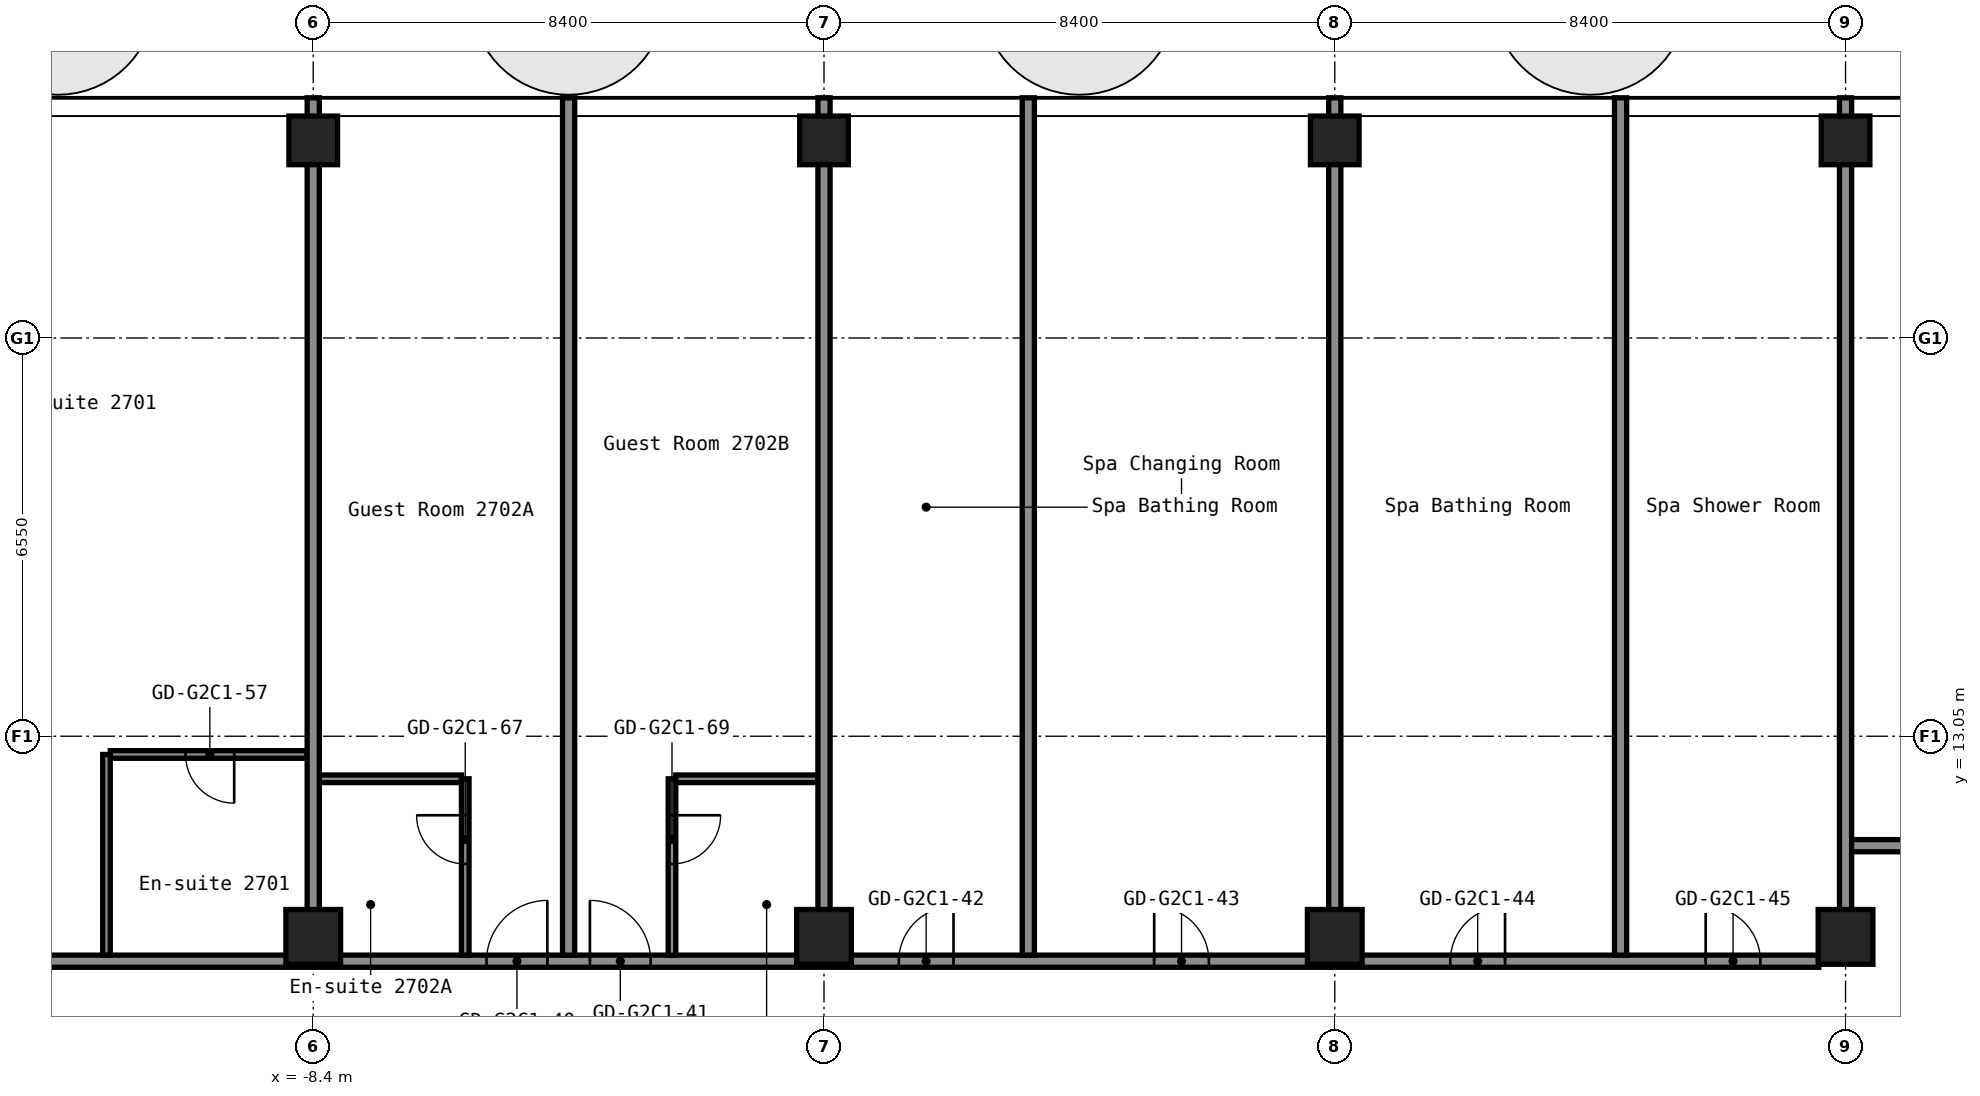
"""IFC4 building model, lengths in metres.
Left out: names, types, materials, properties, quantities, classifications, styles, units other than length and angle.
Written with IfcOpenShell. Run it as: python <this file> out.ifc"""

import sys

from ifc_helpers import new_model, si_unit, direction, frame, frame_2d, origin, origin_2d, place, context, subcontext, project, spatial, rectangle, hollow_rectangle, extrude, element, fill, save


model = new_model("IFC4")
c1 = context("Model", 3, precision=1e-05, world=origin(), true_north=direction((0.0, 1.0)))
c2 = subcontext(c1, "Body", "Model", "MODEL_VIEW")
j1 = project(units=[si_unit("LENGTHUNIT", "METRE"), si_unit("PLANEANGLEUNIT", "RADIAN")], contexts=[c1])
p1 = place(None, origin())
s1 = spatial("IfcSite", under=j1, at=p1, CompositionType="ELEMENT")
p2 = place(p1, origin())
s2 = spatial("IfcBuilding", under=s1, at=p2, CompositionType="ELEMENT")
p3 = place(p2, frame((0.0, 0.0, 97.8)))
s3 = spatial("IfcBuildingStorey", under=s2, at=p3, CompositionType="ELEMENT", Elevation=97.8)
p4 = place(p3, frame((-8.4, 9.75, 0.0), z_axis=(0.0, 0.0, 1.0), x_axis=(1.0, 0.0, 0.0)))
e1 = element("IfcColumn", 1, at=p4, inside=s3, PredefinedType="COLUMN", context=c2, shape_type="SweptSolid", body=[
    extrude(hollow_rectangle(XDim=0.9, YDim=0.9, WallThickness=0.036, at=origin_2d()), origin(), (0.0, 0.0, 1.0), 2.8),
])
p5 = place(p3, frame((-8.4, 22.85, 0.0), z_axis=(0.0, 0.0, 1.0), x_axis=(1.0, 0.0, 0.0)))
e2 = element("IfcColumn", 2, at=p5, inside=s3, PredefinedType="COLUMN", context=c2, shape_type="SweptSolid", body=[
    extrude(hollow_rectangle(XDim=0.8, YDim=0.8, WallThickness=0.032, at=origin_2d()), origin(), (0.0, 0.0, 1.0), 2.8),
])
p6 = place(p3, frame((0.0, 9.75, 0.0), z_axis=(0.0, 0.0, 1.0), x_axis=(1.0, 0.0, 0.0)))
e3 = element("IfcColumn", 3, at=p6, inside=s3, PredefinedType="COLUMN", context=c2, shape_type="SweptSolid", body=[
    extrude(hollow_rectangle(XDim=0.9, YDim=0.9, WallThickness=0.036, at=origin_2d()), origin(), (0.0, 0.0, 1.0), 2.8),
])
p7 = place(p3, frame((0.0, 22.85, 0.0), z_axis=(0.0, 0.0, 1.0), x_axis=(1.0, 0.0, 0.0)))
e4 = element("IfcColumn", 4, at=p7, inside=s3, PredefinedType="COLUMN", context=c2, shape_type="SweptSolid", body=[
    extrude(hollow_rectangle(XDim=0.8, YDim=0.8, WallThickness=0.032, at=origin_2d()), origin(), (0.0, 0.0, 1.0), 2.8),
])
p8 = place(p3, frame((8.4, 9.75, 0.0), z_axis=(0.0, 0.0, 1.0), x_axis=(1.0, 0.0, 0.0)))
e5 = element("IfcColumn", 5, at=p8, inside=s3, PredefinedType="COLUMN", context=c2, shape_type="SweptSolid", body=[
    extrude(hollow_rectangle(XDim=0.9, YDim=0.9, WallThickness=0.036, at=origin_2d()), origin(), (0.0, 0.0, 1.0), 2.8),
])
p9 = place(p3, frame((8.4, 22.85, 0.0), z_axis=(0.0, 0.0, 1.0), x_axis=(1.0, 0.0, 0.0)))
e6 = element("IfcColumn", 6, at=p9, inside=s3, PredefinedType="COLUMN", context=c2, shape_type="SweptSolid", body=[
    extrude(hollow_rectangle(XDim=0.8, YDim=0.8, WallThickness=0.032, at=origin_2d()), origin(), (0.0, 0.0, 1.0), 2.8),
])
p10 = place(p3, frame((16.8, 9.75, 0.0), z_axis=(0.0, 0.0, 1.0), x_axis=(1.0, 0.0, 0.0)))
e7 = element("IfcColumn", 7, at=p10, inside=s3, PredefinedType="COLUMN", context=c2, shape_type="SweptSolid", body=[
    extrude(hollow_rectangle(XDim=0.9, YDim=0.9, WallThickness=0.036, at=origin_2d()), origin(), (0.0, 0.0, 1.0), 2.8),
])
p11 = place(p3, frame((16.8, 22.85, 0.0), z_axis=(0.0, 0.0, 1.0), x_axis=(1.0, 0.0, 0.0)))
e8 = element("IfcColumn", 8, at=p11, inside=s3, PredefinedType="COLUMN", context=c2, shape_type="SweptSolid", body=[
    extrude(hollow_rectangle(XDim=0.8, YDim=0.8, WallThickness=0.032, at=origin_2d()), origin(), (0.0, 0.0, 1.0), 2.8),
])
p12 = place(p3, frame((-16.36, 9.35, 0.0), z_axis=(0.0, 0.0, 1.0), x_axis=(1.0, 0.0, 0.0)))
e9 = element("IfcWall", 9, at=p12, inside=s3, PredefinedType="PARTITIONING", context=c2, shape_type="SweptSolid", body=[
    extrude(rectangle(XDim=32.72, YDim=0.2, at=frame_2d((16.36, 0.0))), origin(), (0.0, 0.0, 1.0), 2.8),
])
p13 = place(p12, frame((1.56, 0.0, 0.0)))
e10 = element("IfcOpeningElement", 10, at=p13, cuts=e9, PredefinedType="OPENING", context=c2, shape_type="SweptSolid", body=[
    extrude(rectangle(XDim=1.0, YDim=2.1, at=frame_2d((0.5, 1.05))), frame((0.0, 0.11, 0.0), z_axis=(0.0, -1.0, 0.0), x_axis=(1.0, 0.0, 0.0)), (0.0, 0.0, 1.0), 0.22),
])
p14 = place(p12, frame((10.81, 0.0, 0.0)))
e11 = element("IfcOpeningElement", 11, at=p14, cuts=e9, PredefinedType="OPENING", context=c2, shape_type="SweptSolid", body=[
    extrude(rectangle(XDim=1.0, YDim=2.1, at=frame_2d((0.5, 1.05))), frame((0.0, 0.11, 0.0), z_axis=(0.0, -1.0, 0.0), x_axis=(1.0, 0.0, 0.0)), (0.0, 0.0, 1.0), 0.22),
])
p15 = place(p12, frame((12.51, 0.0, 0.0)))
e12 = element("IfcOpeningElement", 12, at=p15, cuts=e9, PredefinedType="OPENING", context=c2, shape_type="SweptSolid", body=[
    extrude(rectangle(XDim=1.0, YDim=2.1, at=frame_2d((0.5, 1.05))), frame((0.0, 0.11, 0.0), z_axis=(0.0, -1.0, 0.0), x_axis=(1.0, 0.0, 0.0)), (0.0, 0.0, 1.0), 0.22),
])
p16 = place(p12, frame((17.59, 0.0, 0.0)))
e13 = element("IfcOpeningElement", 13, at=p16, cuts=e9, PredefinedType="OPENING", context=c2, shape_type="SweptSolid", body=[
    extrude(rectangle(XDim=0.9, YDim=2.1, at=frame_2d((0.45, 1.05))), frame((0.0, 0.11, 0.0), z_axis=(0.0, -1.0, 0.0), x_axis=(1.0, 0.0, 0.0)), (0.0, 0.0, 1.0), 0.22),
])
p17 = place(p12, frame((21.79, 0.0, 0.0)))
e14 = element("IfcOpeningElement", 14, at=p17, cuts=e9, PredefinedType="OPENING", context=c2, shape_type="SweptSolid", body=[
    extrude(rectangle(XDim=0.9, YDim=2.1, at=frame_2d((0.45, 1.05))), frame((0.0, 0.11, 0.0), z_axis=(0.0, -1.0, 0.0), x_axis=(1.0, 0.0, 0.0)), (0.0, 0.0, 1.0), 0.22),
])
p18 = place(p12, frame((26.66, 0.0, 0.0)))
e15 = element("IfcOpeningElement", 15, at=p18, cuts=e9, PredefinedType="OPENING", context=c2, shape_type="SweptSolid", body=[
    extrude(rectangle(XDim=0.9, YDim=2.1, at=frame_2d((0.45, 1.05))), frame((0.0, 0.11, 0.0), z_axis=(0.0, -1.0, 0.0), x_axis=(1.0, 0.0, 0.0)), (0.0, 0.0, 1.0), 0.22),
])
p19 = place(p12, frame((30.86, 0.0, 0.0)))
e16 = element("IfcOpeningElement", 16, at=p19, cuts=e9, PredefinedType="OPENING", context=c2, shape_type="SweptSolid", body=[
    extrude(rectangle(XDim=0.9, YDim=2.1, at=frame_2d((0.45, 1.05))), frame((0.0, 0.11, 0.0), z_axis=(0.0, -1.0, 0.0), x_axis=(1.0, 0.0, 0.0)), (0.0, 0.0, 1.0), 0.22),
])
p20 = place(p3, frame((16.8, 11.25, 0.0), z_axis=(0.0, 0.0, 1.0), x_axis=(1.0, 0.0, 0.0)))
e17 = element("IfcWall", 17, at=p20, inside=s3, PredefinedType="PARTITIONING", context=c2, shape_type="SweptSolid", body=[
    extrude(rectangle(XDim=29.7, YDim=0.2, at=frame_2d((14.85, 0.0))), origin(), (0.0, 0.0, 1.0), 2.8),
])
p21 = place(p20, frame((2.0, 0.0, 0.0)))
e18 = element("IfcOpeningElement", 18, at=p21, cuts=e17, PredefinedType="OPENING", context=c2, shape_type="SweptSolid", body=[
    extrude(rectangle(XDim=1.0, YDim=2.1, at=frame_2d((0.5, 1.05))), frame((0.0, 0.11, 0.0), z_axis=(0.0, -1.0, 0.0), x_axis=(1.0, 0.0, 0.0)), (0.0, 0.0, 1.0), 0.22),
])
p22 = place(p20, frame((11.25, 0.0, 0.0)))
e19 = element("IfcOpeningElement", 19, at=p22, cuts=e17, PredefinedType="OPENING", context=c2, shape_type="SweptSolid", body=[
    extrude(rectangle(XDim=1.0, YDim=2.1, at=frame_2d((0.5, 1.05))), frame((0.0, 0.11, 0.0), z_axis=(0.0, -1.0, 0.0), x_axis=(1.0, 0.0, 0.0)), (0.0, 0.0, 1.0), 0.22),
])
p23 = place(p20, frame((12.95, 0.0, 0.0)))
e20 = element("IfcOpeningElement", 20, at=p23, cuts=e17, PredefinedType="OPENING", context=c2, shape_type="SweptSolid", body=[
    extrude(rectangle(XDim=1.0, YDim=2.1, at=frame_2d((0.5, 1.05))), frame((0.0, 0.11, 0.0), z_axis=(0.0, -1.0, 0.0), x_axis=(1.0, 0.0, 0.0)), (0.0, 0.0, 1.0), 0.22),
])
p24 = place(p20, frame((22.2, 0.0, 0.0)))
e21 = element("IfcOpeningElement", 21, at=p24, cuts=e17, PredefinedType="OPENING", context=c2, shape_type="SweptSolid", body=[
    extrude(rectangle(XDim=1.0, YDim=2.1, at=frame_2d((0.5, 1.05))), frame((0.0, 0.11, 0.0), z_axis=(0.0, -1.0, 0.0), x_axis=(1.0, 0.0, 0.0)), (0.0, 0.0, 1.0), 0.22),
])
p25 = place(p20, frame((26.85, 0.0, 0.0)))
e22 = element("IfcOpeningElement", 22, at=p25, cuts=e17, PredefinedType="OPENING", context=c2, shape_type="SweptSolid", body=[
    extrude(rectangle(XDim=0.9, YDim=2.1, at=frame_2d((0.45, 1.05))), frame((0.0, 0.11, 0.0), z_axis=(0.0, -1.0, 0.0), x_axis=(1.0, 0.0, 0.0)), (0.0, 0.0, 1.0), 0.22),
])
p26 = place(p3, frame((-8.3, 12.35, 0.0), z_axis=(0.0, 0.0, 1.0), x_axis=(1.0, 0.0, 0.0)))
e23 = element("IfcWall", 23, at=p26, inside=s3, PredefinedType="PARTITIONING", context=c2, shape_type="SweptSolid", body=[
    extrude(rectangle(XDim=2.338, YDim=0.125, at=frame_2d((1.169, 0.0))), origin(), (0.0, 0.0, 1.0), 2.8),
])
p27 = place(p3, frame((-2.438, 12.35, 0.0), z_axis=(0.0, 0.0, 1.0), x_axis=(1.0, 0.0, 0.0)))
e24 = element("IfcWall", 24, at=p27, inside=s3, PredefinedType="PARTITIONING", context=c2, shape_type="SweptSolid", body=[
    extrude(rectangle(XDim=2.337, YDim=0.125, at=frame_2d((1.169, 0.0))), origin(), (0.0, 0.0, 1.0), 2.8),
])
p28 = place(p3, frame((-11.738, 12.75, 0.0), z_axis=(0.0, 0.0, 1.0), x_axis=(1.0, 0.0, 0.0)))
e25 = element("IfcWall", 25, at=p28, inside=s3, PredefinedType="PARTITIONING", context=c2, shape_type="SweptSolid", body=[
    extrude(rectangle(XDim=3.238, YDim=0.125, at=frame_2d((1.619, 0.0))), origin(), (0.0, 0.0, 1.0), 2.8),
])
p29 = place(p28, frame((1.238, 0.0, 0.0)))
e26 = element("IfcOpeningElement", 26, at=p29, cuts=e25, PredefinedType="OPENING", context=c2, shape_type="SweptSolid", body=[
    extrude(rectangle(XDim=0.8, YDim=2.1, at=frame_2d((0.4, 1.05))), frame((0.0, 0.073, 0.0), z_axis=(0.0, -1.0, 0.0), x_axis=(1.0, 0.0, 0.0)), (0.0, 0.0, 1.0), 0.145),
])
p30 = place(p3, frame((-11.8, 9.45, 0.0), z_axis=(0.0, 0.0, 1.0), x_axis=(0.0, 1.0, 0.0)))
e27 = element("IfcWall", 27, at=p30, inside=s3, PredefinedType="PARTITIONING", context=c2, shape_type="SweptSolid", body=[
    extrude(rectangle(XDim=3.3, YDim=0.125, at=frame_2d((1.65, 0.0))), origin(), (0.0, 0.0, 1.0), 2.8),
])
p31 = place(p3, frame((-8.4, 10.19, 0.0), z_axis=(0.0, 0.0, 1.0), x_axis=(0.0, 1.0, 0.0)))
e28 = element("IfcWall", 28, at=p31, inside=s3, PredefinedType="PARTITIONING", context=c2, shape_type="SweptSolid", body=[
    extrude(rectangle(XDim=13.36, YDim=0.2, at=frame_2d((6.68, 0.0))), origin(), (0.0, 0.0, 1.0), 2.8),
])
p32 = place(p3, frame((-5.9, 9.45, 0.0), z_axis=(0.0, 0.0, 1.0), x_axis=(0.0, 1.0, 0.0)))
e29 = element("IfcWall", 29, at=p32, inside=s3, PredefinedType="PARTITIONING", context=c2, shape_type="SweptSolid", body=[
    extrude(rectangle(XDim=2.9, YDim=0.125, at=frame_2d((1.45, 0.0))), origin(), (0.0, 0.0, 1.0), 2.8),
])
p33 = place(p32, frame((1.5, 0.0, 0.0)))
e30 = element("IfcOpeningElement", 30, at=p33, cuts=e29, PredefinedType="OPENING", context=c2, shape_type="SweptSolid", body=[
    extrude(rectangle(XDim=0.8, YDim=2.1, at=frame_2d((0.4, 1.05))), frame((0.0, 0.073, 0.0), z_axis=(0.0, -1.0, 0.0), x_axis=(1.0, 0.0, 0.0)), (0.0, 0.0, 1.0), 0.145),
])
p34 = place(p3, frame((-4.2, 9.45, 0.0), z_axis=(0.0, 0.0, 1.0), x_axis=(0.0, 1.0, 0.0)))
e31 = element("IfcWall", 31, at=p34, inside=s3, PredefinedType="PARTITIONING", context=c2, shape_type="SweptSolid", body=[
    extrude(rectangle(XDim=14.1, YDim=0.2, at=frame_2d((7.05, 0.0))), origin(), (0.0, 0.0, 1.0), 2.8),
])
p35 = place(p3, frame((-2.5, 9.45, 0.0), z_axis=(0.0, 0.0, 1.0), x_axis=(0.0, 1.0, 0.0)))
e32 = element("IfcWall", 32, at=p35, inside=s3, PredefinedType="PARTITIONING", context=c2, shape_type="SweptSolid", body=[
    extrude(rectangle(XDim=2.9, YDim=0.125, at=frame_2d((1.45, 0.0))), origin(), (0.0, 0.0, 1.0), 2.8),
])
p36 = place(p35, frame((1.5, 0.0, 0.0)))
e33 = element("IfcOpeningElement", 33, at=p36, cuts=e32, PredefinedType="OPENING", context=c2, shape_type="SweptSolid", body=[
    extrude(rectangle(XDim=0.8, YDim=2.1, at=frame_2d((0.4, 1.05))), frame((0.0, 0.073, 0.0), z_axis=(0.0, -1.0, 0.0), x_axis=(1.0, 0.0, 0.0)), (0.0, 0.0, 1.0), 0.145),
])
p37 = place(p3, frame((0.0, 10.19, 0.0), z_axis=(0.0, 0.0, 1.0), x_axis=(0.0, 1.0, 0.0)))
e34 = element("IfcWall", 34, at=p37, inside=s3, PredefinedType="PARTITIONING", context=c2, shape_type="SweptSolid", body=[
    extrude(rectangle(XDim=13.36, YDim=0.2, at=frame_2d((6.68, 0.0))), origin(), (0.0, 0.0, 1.0), 2.8),
])
p38 = place(p3, frame((3.36, 9.45, 0.0), z_axis=(0.0, 0.0, 1.0), x_axis=(0.0, 1.0, 0.0)))
e35 = element("IfcWall", 35, at=p38, inside=s3, PredefinedType="PARTITIONING", context=c2, shape_type="SweptSolid", body=[
    extrude(rectangle(XDim=14.1, YDim=0.2, at=frame_2d((7.05, 0.0))), origin(), (0.0, 0.0, 1.0), 2.8),
])
p39 = place(p3, frame((8.4, 10.19, 0.0), z_axis=(0.0, 0.0, 1.0), x_axis=(0.0, 1.0, 0.0)))
e36 = element("IfcWall", 36, at=p39, inside=s3, PredefinedType="PARTITIONING", context=c2, shape_type="SweptSolid", body=[
    extrude(rectangle(XDim=13.36, YDim=0.2, at=frame_2d((6.68, 0.0))), origin(), (0.0, 0.0, 1.0), 2.8),
])
p40 = place(p3, frame((13.1, 9.45, 0.0), z_axis=(0.0, 0.0, 1.0), x_axis=(0.0, 1.0, 0.0)))
e37 = element("IfcWall", 37, at=p40, inside=s3, PredefinedType="PARTITIONING", context=c2, shape_type="SweptSolid", body=[
    extrude(rectangle(XDim=14.1, YDim=0.2, at=frame_2d((7.05, 0.0))), origin(), (0.0, 0.0, 1.0), 2.8),
])
p41 = place(p3, frame((16.8, 10.19, 0.0), z_axis=(0.0, 0.0, 1.0), x_axis=(0.0, 1.0, 0.0)))
e38 = element("IfcWall", 38, at=p41, inside=s3, PredefinedType="PARTITIONING", context=c2, shape_type="SweptSolid", body=[
    extrude(rectangle(XDim=13.36, YDim=0.2, at=frame_2d((6.68, 0.0))), origin(), (0.0, 0.0, 1.0), 2.8),
])
p42 = place(p14, origin())
e39 = element("IfcDoor", 39, at=p42, inside=s3, OperationType="SINGLE_SWING_LEFT", PredefinedType="DOOR", context=c2, shape_type="SweptSolid", body=[
    extrude(rectangle(XDim=1.0, YDim=2.1, at=frame_2d((0.5, 1.05))), frame((0.0, 0.025, 0.0), z_axis=(0.0, -1.0, 0.0), x_axis=(1.0, 0.0, 0.0)), (0.0, 0.0, 1.0), 0.05),
])
fill(e11, e39)
p43 = place(p15, origin())
e40 = element("IfcDoor", 40, at=p43, inside=s3, OperationType="SINGLE_SWING_RIGHT", PredefinedType="DOOR", context=c2, shape_type="SweptSolid", body=[
    extrude(rectangle(XDim=1.0, YDim=2.1, at=frame_2d((0.5, 1.05))), frame((0.0, 0.025, 0.0), z_axis=(0.0, -1.0, 0.0), x_axis=(1.0, 0.0, 0.0)), (0.0, 0.0, 1.0), 0.05),
])
fill(e12, e40)
p44 = place(p16, origin())
e41 = element("IfcDoor", 41, at=p44, inside=s3, OperationType="SINGLE_SWING_LEFT", PredefinedType="DOOR", context=c2, shape_type="SweptSolid", body=[
    extrude(rectangle(XDim=0.9, YDim=2.1, at=frame_2d((0.45, 1.05))), frame((0.0, 0.025, 0.0), z_axis=(0.0, -1.0, 0.0), x_axis=(1.0, 0.0, 0.0)), (0.0, 0.0, 1.0), 0.05),
])
fill(e13, e41)
p45 = place(p17, origin())
e42 = element("IfcDoor", 42, at=p45, inside=s3, OperationType="SINGLE_SWING_RIGHT", PredefinedType="DOOR", context=c2, shape_type="SweptSolid", body=[
    extrude(rectangle(XDim=0.9, YDim=2.1, at=frame_2d((0.45, 1.05))), frame((0.0, 0.025, 0.0), z_axis=(0.0, -1.0, 0.0), x_axis=(1.0, 0.0, 0.0)), (0.0, 0.0, 1.0), 0.05),
])
fill(e14, e42)
p46 = place(p18, origin())
e43 = element("IfcDoor", 43, at=p46, inside=s3, OperationType="SINGLE_SWING_LEFT", PredefinedType="DOOR", context=c2, shape_type="SweptSolid", body=[
    extrude(rectangle(XDim=0.9, YDim=2.1, at=frame_2d((0.45, 1.05))), frame((0.0, 0.025, 0.0), z_axis=(0.0, -1.0, 0.0), x_axis=(1.0, 0.0, 0.0)), (0.0, 0.0, 1.0), 0.05),
])
fill(e15, e43)
p47 = place(p19, origin())
e44 = element("IfcDoor", 44, at=p47, inside=s3, OperationType="SINGLE_SWING_RIGHT", PredefinedType="DOOR", context=c2, shape_type="SweptSolid", body=[
    extrude(rectangle(XDim=0.9, YDim=2.1, at=frame_2d((0.45, 1.05))), frame((0.0, 0.025, 0.0), z_axis=(0.0, -1.0, 0.0), x_axis=(1.0, 0.0, 0.0)), (0.0, 0.0, 1.0), 0.05),
])
fill(e16, e44)
p48 = place(p29, origin())
e45 = element("IfcDoor", 45, at=p48, inside=s3, OperationType="SINGLE_SWING_RIGHT", PredefinedType="DOOR", context=c2, shape_type="SweptSolid", body=[
    extrude(rectangle(XDim=0.8, YDim=2.1, at=frame_2d((0.4, 1.05))), frame((0.0, 0.025, 0.0), z_axis=(0.0, -1.0, 0.0), x_axis=(1.0, 0.0, 0.0)), (0.0, 0.0, 1.0), 0.05),
])
fill(e26, e45)
p49 = place(p33, origin())
e46 = element("IfcDoor", 46, at=p49, inside=s3, OperationType="SINGLE_SWING_LEFT", PredefinedType="DOOR", context=c2, shape_type="SweptSolid", body=[
    extrude(rectangle(XDim=0.8, YDim=2.1, at=frame_2d((0.4, 1.05))), frame((0.0, 0.025, 0.0), z_axis=(0.0, -1.0, 0.0), x_axis=(1.0, 0.0, 0.0)), (0.0, 0.0, 1.0), 0.05),
])
fill(e30, e46)
p50 = place(p36, origin())
e47 = element("IfcDoor", 47, at=p50, inside=s3, OperationType="SINGLE_SWING_RIGHT", PredefinedType="DOOR", context=c2, shape_type="SweptSolid", body=[
    extrude(rectangle(XDim=0.8, YDim=2.1, at=frame_2d((0.4, 1.05))), frame((0.0, 0.025, 0.0), z_axis=(0.0, -1.0, 0.0), x_axis=(1.0, 0.0, 0.0)), (0.0, 0.0, 1.0), 0.05),
])
fill(e33, e47)
save(model, sys.argv[1])
